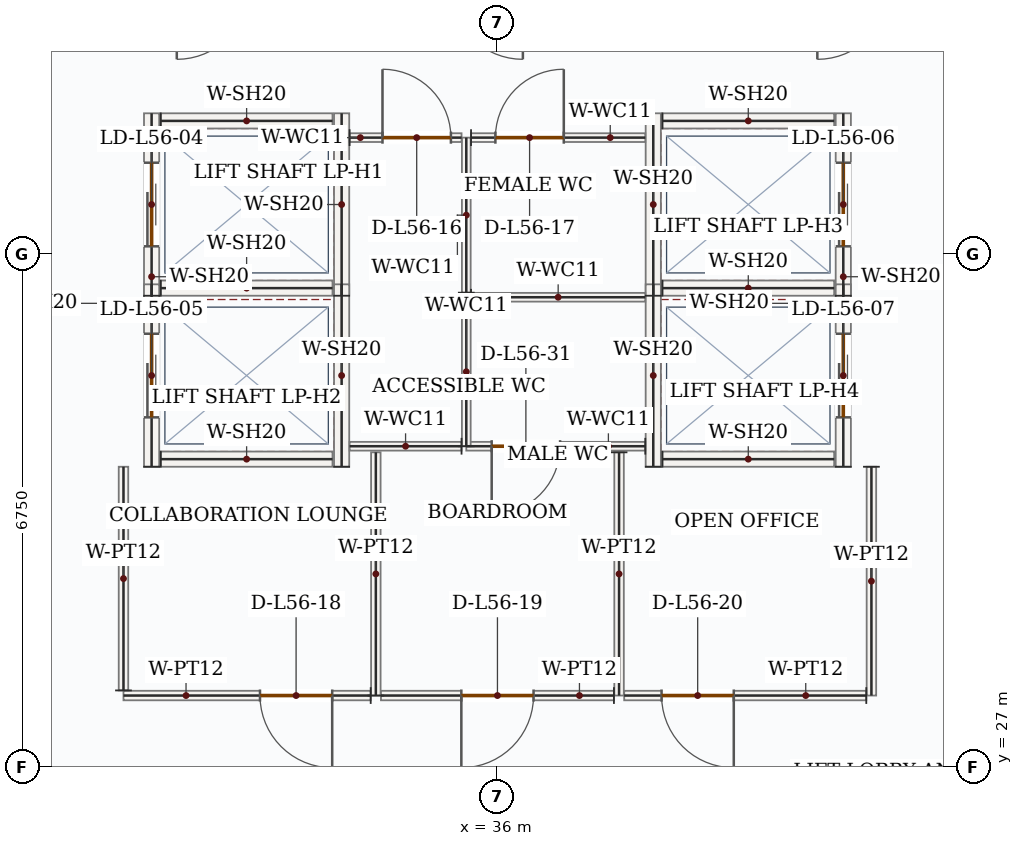
"""IFC4 building model, lengths in metres.
Left out: names, types, materials, properties, quantities, classifications, styles, units other than length and angle.
Written with IfcOpenShell. Run it as: python <this file> out.ifc"""

import sys

from ifc_helpers import new_model, si_unit, direction, frame, frame_2d, origin, place, context, subcontext, project, spatial, rectangle, extrude, source, transform, mapped, element, fill, save


model = new_model("IFC4")
c1 = context("Model", 3, precision=1e-05, world=origin(), true_north=direction((0.0, 1.0)))
c2 = subcontext(c1, "Body", "Model", "MODEL_VIEW")
j1 = project(units=[si_unit("LENGTHUNIT", "METRE"), si_unit("PLANEANGLEUNIT", "RADIAN")], contexts=[c1])
p1 = place(None, origin())
s1 = spatial("IfcSite", under=j1, at=p1, CompositionType="ELEMENT")
p2 = place(p1, origin())
s2 = spatial("IfcBuilding", under=s1, at=p2, CompositionType="ELEMENT")
p3 = place(p2, frame((0.0, 0.0, 239.1)))
s3 = spatial("IfcBuildingStorey", under=s2, at=p3, CompositionType="ELEMENT", Elevation=239.1)
p4 = place(p3, frame((31.45, 33.2, 0.0), z_axis=(0.0, 0.0, 1.0), x_axis=(0.0, 1.0, 0.0)))
e1 = element("IfcWall", 1, at=p4, inside=s3, PredefinedType="SOLIDWALL", context=c2, shape_type="SweptSolid", body=[
    extrude(rectangle(XDim=2.4, YDim=0.2, at=frame_2d((1.2, 0.0))), origin(), (0.0, 0.0, 1.0), 3.5),
])
p5 = place(p4, frame((0.65, 0.0, 0.0)))
e2 = element("IfcOpeningElement", 2, at=p5, cuts=e1, PredefinedType="OPENING", context=c2, shape_type="SweptSolid", body=[
    extrude(rectangle(XDim=1.1, YDim=2.15, at=frame_2d((0.55, 1.075))), frame((0.0, 0.11, 0.0), z_axis=(0.0, -1.0, 0.0), x_axis=(1.0, 0.0, 0.0)), (0.0, 0.0, 1.0), 0.22),
])
m1 = source(origin(), c2, "Body", "SweptSolid", [
    extrude(rectangle(XDim=2.4, YDim=0.2, at=frame_2d((1.2, 0.0))), origin(), (0.0, 0.0, 1.0), 3.5),
])
p6 = place(p3, frame((33.95, 33.2, 0.0), z_axis=(0.0, 0.0, 1.0), x_axis=(0.0, 1.0, 0.0)))
e3 = element("IfcWall", 3, at=p6, inside=s3, PredefinedType="SOLIDWALL", context=c2, shape_type="MappedRepresentation", body=[
    mapped(m1, transform((0.0, 0.0, 0.0), x_axis=(1.0, 0.0, 0.0), y_axis=(0.0, 1.0, 0.0), z_axis=(0.0, 0.0, 1.0), scale=1.0)),
])
m2 = source(origin(), c2, "Body", "SweptSolid", [
    extrude(rectangle(XDim=2.26, YDim=0.2, at=frame_2d((1.13, 0.0))), origin(), (0.0, 0.0, 1.0), 3.5),
])
for number, where, z_axis, x_axis in (
    (4, (31.57, 33.3, 0.0), (0.0, 0.0, 1.0), (1.0, 0.0, 0.0)),
    (5, (31.57, 35.5, 0.0), (0.0, 0.0, 1.0), (1.0, 0.0, 0.0)),
):
    element("IfcWall", number, at=place(p3, frame(where, z_axis=z_axis, x_axis=x_axis)), inside=s3, PredefinedType="SOLIDWALL", context=c2, shape_type="MappedRepresentation", body=[
        mapped(m2, transform((0.0, 0.0, 0.0), x_axis=(1.0, 0.0, 0.0), y_axis=(0.0, 1.0, 0.0), z_axis=(0.0, 0.0, 1.0), scale=1.0)),
    ])
p7 = place(p3, frame((31.45, 30.95, 0.0), z_axis=(0.0, 0.0, 1.0), x_axis=(0.0, 1.0, 0.0)))
e6 = element("IfcWall", 6, at=p7, inside=s3, PredefinedType="SOLIDWALL", context=c2, shape_type="SweptSolid", body=[
    extrude(rectangle(XDim=2.4, YDim=0.2, at=frame_2d((1.2, 0.0))), origin(), (0.0, 0.0, 1.0), 3.5),
])
p8 = place(p7, frame((0.65, 0.0, 0.0)))
e7 = element("IfcOpeningElement", 7, at=p8, cuts=e6, PredefinedType="OPENING", context=c2, shape_type="SweptSolid", body=[
    extrude(rectangle(XDim=1.1, YDim=2.15, at=frame_2d((0.55, 1.075))), frame((0.0, 0.11, 0.0), z_axis=(0.0, -1.0, 0.0), x_axis=(1.0, 0.0, 0.0)), (0.0, 0.0, 1.0), 0.22),
])
p9 = place(p3, frame((33.95, 30.95, 0.0), z_axis=(0.0, 0.0, 1.0), x_axis=(0.0, 1.0, 0.0)))
e8 = element("IfcWall", 8, at=p9, inside=s3, PredefinedType="SOLIDWALL", context=c2, shape_type="MappedRepresentation", body=[
    mapped(m1, transform((0.0, 0.0, 0.0), x_axis=(1.0, 0.0, 0.0), y_axis=(0.0, 1.0, 0.0), z_axis=(0.0, 0.0, 1.0), scale=1.0)),
])
p10 = place(p3, frame((31.57, 31.05, 0.0), z_axis=(0.0, 0.0, 1.0), x_axis=(1.0, 0.0, 0.0)))
e9 = element("IfcWall", 9, at=p10, inside=s3, PredefinedType="SOLIDWALL", context=c2, shape_type="MappedRepresentation", body=[
    mapped(m2, transform((0.0, 0.0, 0.0), x_axis=(1.0, 0.0, 0.0), y_axis=(0.0, 1.0, 0.0), z_axis=(0.0, 0.0, 1.0), scale=1.0)),
])
p11 = place(p3, frame((38.05, 33.2, 0.0), z_axis=(0.0, 0.0, 1.0), x_axis=(0.0, 1.0, 0.0)))
e10 = element("IfcWall", 10, at=p11, inside=s3, PredefinedType="SOLIDWALL", context=c2, shape_type="MappedRepresentation", body=[
    mapped(m1, transform((0.0, 0.0, 0.0), x_axis=(1.0, 0.0, 0.0), y_axis=(0.0, 1.0, 0.0), z_axis=(0.0, 0.0, 1.0), scale=1.0)),
])
p12 = place(p3, frame((40.55, 33.2, 0.0), z_axis=(0.0, 0.0, 1.0), x_axis=(0.0, 1.0, 0.0)))
e11 = element("IfcWall", 11, at=p12, inside=s3, PredefinedType="SOLIDWALL", context=c2, shape_type="SweptSolid", body=[
    extrude(rectangle(XDim=2.4, YDim=0.2, at=frame_2d((1.2, 0.0))), origin(), (0.0, 0.0, 1.0), 3.5),
])
p13 = place(p12, frame((0.65, 0.0, 0.0)))
e12 = element("IfcOpeningElement", 12, at=p13, cuts=e11, PredefinedType="OPENING", context=c2, shape_type="SweptSolid", body=[
    extrude(rectangle(XDim=1.1, YDim=2.15, at=frame_2d((0.55, 1.075))), frame((0.0, 0.11, 0.0), z_axis=(0.0, -1.0, 0.0), x_axis=(1.0, 0.0, 0.0)), (0.0, 0.0, 1.0), 0.22),
])
for number, where, z_axis, x_axis in (
    (13, (38.17, 33.3, 0.0), (0.0, 0.0, 1.0), (1.0, 0.0, 0.0)),
    (14, (38.17, 35.5, 0.0), (0.0, 0.0, 1.0), (1.0, 0.0, 0.0)),
):
    element("IfcWall", number, at=place(p3, frame(where, z_axis=z_axis, x_axis=x_axis)), inside=s3, PredefinedType="SOLIDWALL", context=c2, shape_type="MappedRepresentation", body=[
        mapped(m2, transform((0.0, 0.0, 0.0), x_axis=(1.0, 0.0, 0.0), y_axis=(0.0, 1.0, 0.0), z_axis=(0.0, 0.0, 1.0), scale=1.0)),
    ])
p14 = place(p3, frame((38.05, 30.95, 0.0), z_axis=(0.0, 0.0, 1.0), x_axis=(0.0, 1.0, 0.0)))
e15 = element("IfcWall", 15, at=p14, inside=s3, PredefinedType="SOLIDWALL", context=c2, shape_type="MappedRepresentation", body=[
    mapped(m1, transform((0.0, 0.0, 0.0), x_axis=(1.0, 0.0, 0.0), y_axis=(0.0, 1.0, 0.0), z_axis=(0.0, 0.0, 1.0), scale=1.0)),
])
p15 = place(p3, frame((40.55, 30.95, 0.0), z_axis=(0.0, 0.0, 1.0), x_axis=(0.0, 1.0, 0.0)))
e16 = element("IfcWall", 16, at=p15, inside=s3, PredefinedType="SOLIDWALL", context=c2, shape_type="SweptSolid", body=[
    extrude(rectangle(XDim=2.4, YDim=0.2, at=frame_2d((1.2, 0.0))), origin(), (0.0, 0.0, 1.0), 3.5),
])
p16 = place(p15, frame((0.65, 0.0, 0.0)))
e17 = element("IfcOpeningElement", 17, at=p16, cuts=e16, PredefinedType="OPENING", context=c2, shape_type="SweptSolid", body=[
    extrude(rectangle(XDim=1.1, YDim=2.15, at=frame_2d((0.55, 1.075))), frame((0.0, 0.11, 0.0), z_axis=(0.0, -1.0, 0.0), x_axis=(1.0, 0.0, 0.0)), (0.0, 0.0, 1.0), 0.22),
])
p17 = place(p3, frame((38.17, 31.05, 0.0), z_axis=(0.0, 0.0, 1.0), x_axis=(1.0, 0.0, 0.0)))
e18 = element("IfcWall", 18, at=p17, inside=s3, PredefinedType="SOLIDWALL", context=c2, shape_type="MappedRepresentation", body=[
    mapped(m2, transform((0.0, 0.0, 0.0), x_axis=(1.0, 0.0, 0.0), y_axis=(0.0, 1.0, 0.0), z_axis=(0.0, 0.0, 1.0), scale=1.0)),
])
p18 = place(p3, frame((37.945, 31.22, 0.0), z_axis=(0.0, 0.0, 1.0), x_axis=(-1.0, 0.0, 0.0)))
e19 = element("IfcWall", 19, at=p18, inside=s3, PredefinedType="PARTITIONING", context=c2, shape_type="SweptSolid", body=[
    extrude(rectangle(XDim=2.355, YDim=0.115, at=frame_2d((1.177, 0.0))), origin(), (0.0, 0.0, 1.0), 3.5),
])
p19 = place(p18, frame((1.121, 0.0, 0.0)))
e20 = element("IfcOpeningElement", 20, at=p19, cuts=e19, PredefinedType="OPENING", context=c2, shape_type="SweptSolid", body=[
    extrude(rectangle(XDim=0.9, YDim=2.1, at=frame_2d((0.45, 1.05))), frame((0.0, 0.067, 0.0), z_axis=(0.0, -1.0, 0.0), x_axis=(1.0, 0.0, 0.0)), (0.0, 0.0, 1.0), 0.135),
])
m3 = source(origin(), c2, "Body", "SweptSolid", [
    extrude(rectangle(XDim=1.96, YDim=0.115, at=frame_2d((0.98, 0.0))), origin(), (0.0, 0.0, 1.0), 3.5),
])
p20 = place(p3, frame((35.59, 31.22, 0.0), z_axis=(0.0, 0.0, 1.0), x_axis=(0.0, 1.0, 0.0)))
e21 = element("IfcWall", 21, at=p20, inside=s3, PredefinedType="PARTITIONING", context=c2, shape_type="MappedRepresentation", body=[
    mapped(m3, transform((0.0, 0.0, 0.0), x_axis=(1.0, 0.0, 0.0), y_axis=(0.0, 1.0, 0.0), z_axis=(0.0, 0.0, 1.0), scale=1.0)),
])
m4 = source(origin(), c2, "Body", "SweptSolid", [
    extrude(rectangle(XDim=2.292, YDim=0.115, at=frame_2d((1.146, 0.0))), origin(), (0.0, 0.0, 1.0), 3.5),
])
p21 = place(p3, frame((35.653, 33.18, 0.0), z_axis=(0.0, 0.0, 1.0), x_axis=(1.0, 0.0, 0.0)))
e22 = element("IfcWall", 22, at=p21, inside=s3, PredefinedType="PARTITIONING", context=c2, shape_type="MappedRepresentation", body=[
    mapped(m4, transform((0.0, 0.0, 0.0), x_axis=(1.0, 0.0, 0.0), y_axis=(0.0, 1.0, 0.0), z_axis=(0.0, 0.0, 1.0), scale=1.0)),
])
m5 = source(origin(), c2, "Body", "SweptSolid", [
    extrude(rectangle(XDim=2.04, YDim=0.115, at=frame_2d((1.02, 0.0))), origin(), (0.0, 0.0, 1.0), 3.5),
])
p22 = place(p3, frame((35.59, 33.24, 0.0), z_axis=(0.0, 0.0, 1.0), x_axis=(0.0, 1.0, 0.0)))
e23 = element("IfcWall", 23, at=p22, inside=s3, PredefinedType="PARTITIONING", context=c2, shape_type="MappedRepresentation", body=[
    mapped(m5, transform((0.0, 0.0, 0.0), x_axis=(1.0, 0.0, 0.0), y_axis=(0.0, 1.0, 0.0), z_axis=(0.0, 0.0, 1.0), scale=1.0)),
])
p23 = place(p3, frame((35.653, 35.28, 0.0), z_axis=(0.0, 0.0, 1.0), x_axis=(1.0, 0.0, 0.0)))
e24 = element("IfcWall", 24, at=p23, inside=s3, PredefinedType="PARTITIONING", context=c2, shape_type="SweptSolid", body=[
    extrude(rectangle(XDim=2.292, YDim=0.115, at=frame_2d((1.146, 0.0))), origin(), (0.0, 0.0, 1.0), 3.5),
])
p24 = place(p23, frame((0.32, 0.0, 0.0)))
e25 = element("IfcOpeningElement", 25, at=p24, cuts=e24, PredefinedType="OPENING", context=c2, shape_type="SweptSolid", body=[
    extrude(rectangle(XDim=0.9, YDim=2.1, at=frame_2d((0.45, 1.05))), frame((0.0, 0.067, 0.0), z_axis=(0.0, -1.0, 0.0), x_axis=(1.0, 0.0, 0.0)), (0.0, 0.0, 1.0), 0.135),
])
m6 = source(origin(), c2, "Body", "SweptSolid", [
    extrude(rectangle(XDim=1.473, YDim=0.115, at=frame_2d((0.736, 0.0))), origin(), (0.0, 0.0, 1.0), 3.5),
])
p25 = place(p3, frame((35.528, 31.22, 0.0), z_axis=(0.0, 0.0, 1.0), x_axis=(-1.0, 0.0, 0.0)))
e26 = element("IfcWall", 26, at=p25, inside=s3, PredefinedType="PARTITIONING", context=c2, shape_type="MappedRepresentation", body=[
    mapped(m6, transform((0.0, 0.0, 0.0), x_axis=(1.0, 0.0, 0.0), y_axis=(0.0, 1.0, 0.0), z_axis=(0.0, 0.0, 1.0), scale=1.0)),
])
p26 = place(p3, frame((34.055, 35.28, 0.0), z_axis=(0.0, 0.0, 1.0), x_axis=(1.0, 0.0, 0.0)))
e27 = element("IfcWall", 27, at=p26, inside=s3, PredefinedType="PARTITIONING", context=c2, shape_type="SweptSolid", body=[
    extrude(rectangle(XDim=1.473, YDim=0.115, at=frame_2d((0.736, 0.0))), origin(), (0.0, 0.0, 1.0), 3.5),
])
p27 = place(p26, frame((0.433, 0.0, 0.0)))
e28 = element("IfcOpeningElement", 28, at=p27, cuts=e27, PredefinedType="OPENING", context=c2, shape_type="SweptSolid", body=[
    extrude(rectangle(XDim=0.9, YDim=2.1, at=frame_2d((0.45, 1.05))), frame((0.0, 0.067, 0.0), z_axis=(0.0, -1.0, 0.0), x_axis=(1.0, 0.0, 0.0)), (0.0, 0.0, 1.0), 0.135),
])
m7 = source(origin(), c2, "Body", "SweptSolid", [
    extrude(rectangle(XDim=3.2, YDim=0.125, at=frame_2d((1.6, 0.0))), origin(), (0.0, 0.0, 1.0), 3.5),
])
for number, where, z_axis, x_axis in (
    (29, (34.4, 27.94, 0.0), (0.0, 0.0, 1.0), (0.0, 1.0, 0.0)),
    (30, (37.6, 31.14, 0.0), (0.0, 0.0, 1.0), (0.0, -1.0, 0.0)),
):
    element("IfcWall", number, at=place(p3, frame(where, z_axis=z_axis, x_axis=x_axis)), inside=s3, PredefinedType="PARTITIONING", context=c2, shape_type="MappedRepresentation", body=[
        mapped(m7, transform((0.0, 0.0, 0.0), x_axis=(1.0, 0.0, 0.0), y_axis=(0.0, 1.0, 0.0), z_axis=(0.0, 0.0, 1.0), scale=1.0)),
    ])
p28 = place(p3, frame((37.532, 27.94, 0.0), z_axis=(0.0, 0.0, 1.0), x_axis=(-1.0, 0.0, 0.0)))
e31 = element("IfcWall", 31, at=p28, inside=s3, PredefinedType="PARTITIONING", context=c2, shape_type="SweptSolid", body=[
    extrude(rectangle(XDim=3.065, YDim=0.125, at=frame_2d((1.532, 0.0))), origin(), (0.0, 0.0, 1.0), 3.5),
])
p29 = place(p28, frame((1.058, 0.0, 0.0)))
e32 = element("IfcOpeningElement", 32, at=p29, cuts=e31, PredefinedType="OPENING", context=c2, shape_type="SweptSolid", body=[
    extrude(rectangle(XDim=0.95, YDim=2.15, at=frame_2d((0.475, 1.075))), frame((0.0, 0.073, 0.0), z_axis=(0.0, -1.0, 0.0), x_axis=(1.0, 0.0, 0.0)), (0.0, 0.0, 1.0), 0.145),
])
p30 = place(p3, frame((34.333, 27.94, 0.0), z_axis=(0.0, 0.0, 1.0), x_axis=(-1.0, 0.0, 0.0)))
e33 = element("IfcWall", 33, at=p30, inside=s3, PredefinedType="PARTITIONING", context=c2, shape_type="SweptSolid", body=[
    extrude(rectangle(XDim=3.252, YDim=0.125, at=frame_2d((1.626, 0.0))), origin(), (0.0, 0.0, 1.0), 3.5),
])
p31 = place(p30, frame((0.507, 0.0, 0.0)))
e34 = element("IfcOpeningElement", 34, at=p31, cuts=e33, PredefinedType="OPENING", context=c2, shape_type="SweptSolid", body=[
    extrude(rectangle(XDim=0.95, YDim=2.15, at=frame_2d((0.475, 1.075))), frame((0.0, 0.073, 0.0), z_axis=(0.0, -1.0, 0.0), x_axis=(1.0, 0.0, 0.0)), (0.0, 0.0, 1.0), 0.145),
])
m8 = source(origin(), c2, "Body", "SweptSolid", [
    extrude(rectangle(XDim=2.942, YDim=0.125, at=frame_2d((1.471, 0.0))), origin(), (0.0, 0.0, 1.0), 3.5),
])
p32 = place(p3, frame((31.08, 28.008, 0.0), z_axis=(0.0, 0.0, 1.0), x_axis=(0.0, 1.0, 0.0)))
e35 = element("IfcWall", 35, at=p32, inside=s3, PredefinedType="PARTITIONING", context=c2, shape_type="MappedRepresentation", body=[
    mapped(m8, transform((0.0, 0.0, 0.0), x_axis=(1.0, 0.0, 0.0), y_axis=(0.0, 1.0, 0.0), z_axis=(0.0, 0.0, 1.0), scale=1.0)),
])
m9 = source(origin(), c2, "Body", "SweptSolid", [
    extrude(rectangle(XDim=3.01, YDim=0.125, at=frame_2d((1.505, 0.0))), origin(), (0.0, 0.0, 1.0), 3.5),
])
p33 = place(p3, frame((40.92, 30.95, 0.0), z_axis=(0.0, 0.0, 1.0), x_axis=(0.0, -1.0, 0.0)))
e36 = element("IfcWall", 36, at=p33, inside=s3, PredefinedType="PARTITIONING", context=c2, shape_type="MappedRepresentation", body=[
    mapped(m9, transform((0.0, 0.0, 0.0), x_axis=(1.0, 0.0, 0.0), y_axis=(0.0, 1.0, 0.0), z_axis=(0.0, 0.0, 1.0), scale=1.0)),
])
p34 = place(p3, frame((40.853, 27.94, 0.0), z_axis=(0.0, 0.0, 1.0), x_axis=(-1.0, 0.0, 0.0)))
e37 = element("IfcWall", 37, at=p34, inside=s3, PredefinedType="PARTITIONING", context=c2, shape_type="SweptSolid", body=[
    extrude(rectangle(XDim=3.185, YDim=0.125, at=frame_2d((1.593, 0.0))), origin(), (0.0, 0.0, 1.0), 3.5),
])
p35 = place(p34, frame((1.743, 0.0, 0.0)))
e38 = element("IfcOpeningElement", 38, at=p35, cuts=e37, PredefinedType="OPENING", context=c2, shape_type="SweptSolid", body=[
    extrude(rectangle(XDim=0.95, YDim=2.15, at=frame_2d((0.475, 1.075))), frame((0.0, 0.073, 0.0), z_axis=(0.0, -1.0, 0.0), x_axis=(1.0, 0.0, 0.0)), (0.0, 0.0, 1.0), 0.145),
])
m10 = source(origin(), c2, "Body", "SweptSolid", [
    extrude(rectangle(XDim=1.1, YDim=2.15, at=frame_2d((0.55, 1.075))), frame((0.0, 0.025, 0.0), z_axis=(0.0, -1.0, 0.0), x_axis=(1.0, 0.0, 0.0)), (0.0, 0.0, 1.0), 0.05),
])
p36 = place(p5, origin())
e39 = element("IfcDoor", 39, at=p36, inside=s3, OperationType="DOUBLE_DOOR_SLIDING", PredefinedType="DOOR", context=c2, shape_type="MappedRepresentation", body=[
    mapped(m10, transform((0.0, 0.0, 0.0), x_axis=(1.0, 0.0, 0.0), y_axis=(0.0, 1.0, 0.0), z_axis=(0.0, 0.0, 1.0), scale=1.0)),
])
fill(e2, e39)
p37 = place(p8, origin())
e40 = element("IfcDoor", 40, at=p37, inside=s3, OperationType="DOUBLE_DOOR_SLIDING", PredefinedType="DOOR", context=c2, shape_type="MappedRepresentation", body=[
    mapped(m10, transform((0.0, 0.0, 0.0), x_axis=(1.0, 0.0, 0.0), y_axis=(0.0, 1.0, 0.0), z_axis=(0.0, 0.0, 1.0), scale=1.0)),
])
fill(e7, e40)
p38 = place(p13, origin())
e41 = element("IfcDoor", 41, at=p38, inside=s3, OperationType="DOUBLE_DOOR_SLIDING", PredefinedType="DOOR", context=c2, shape_type="MappedRepresentation", body=[
    mapped(m10, transform((0.0, 0.0, 0.0), x_axis=(1.0, 0.0, 0.0), y_axis=(0.0, 1.0, 0.0), z_axis=(0.0, 0.0, 1.0), scale=1.0)),
])
fill(e12, e41)
p39 = place(p16, origin())
e42 = element("IfcDoor", 42, at=p39, inside=s3, OperationType="DOUBLE_DOOR_SLIDING", PredefinedType="DOOR", context=c2, shape_type="MappedRepresentation", body=[
    mapped(m10, transform((0.0, 0.0, 0.0), x_axis=(1.0, 0.0, 0.0), y_axis=(0.0, 1.0, 0.0), z_axis=(0.0, 0.0, 1.0), scale=1.0)),
])
fill(e17, e42)
m11 = source(origin(), c2, "Body", "SweptSolid", [
    extrude(rectangle(XDim=0.9, YDim=2.1, at=frame_2d((0.45, 1.05))), frame((0.0, 0.025, 0.0), z_axis=(0.0, -1.0, 0.0), x_axis=(1.0, 0.0, 0.0)), (0.0, 0.0, 1.0), 0.05),
])
p40 = place(p27, origin())
e43 = element("IfcDoor", 43, at=p40, inside=s3, OperationType="SINGLE_SWING_LEFT", PredefinedType="DOOR", context=c2, shape_type="MappedRepresentation", body=[
    mapped(m11, transform((0.0, 0.0, 0.0), x_axis=(1.0, 0.0, 0.0), y_axis=(0.0, 1.0, 0.0), z_axis=(0.0, 0.0, 1.0), scale=1.0)),
])
fill(e28, e43)
p41 = place(p24, origin())
e44 = element("IfcDoor", 44, at=p41, inside=s3, OperationType="SINGLE_SWING_RIGHT", PredefinedType="DOOR", context=c2, shape_type="MappedRepresentation", body=[
    mapped(m11, transform((0.0, 0.0, 0.0), x_axis=(1.0, 0.0, 0.0), y_axis=(0.0, 1.0, 0.0), z_axis=(0.0, 0.0, 1.0), scale=1.0)),
])
fill(e25, e44)
m12 = source(origin(), c2, "Body", "SweptSolid", [
    extrude(rectangle(XDim=0.95, YDim=2.15, at=frame_2d((0.475, 1.075))), frame((0.0, 0.025, 0.0), z_axis=(0.0, -1.0, 0.0), x_axis=(1.0, 0.0, 0.0)), (0.0, 0.0, 1.0), 0.05),
])
p42 = place(p31, origin())
e45 = element("IfcDoor", 45, at=p42, inside=s3, OperationType="SINGLE_SWING_LEFT", PredefinedType="DOOR", context=c2, shape_type="MappedRepresentation", body=[
    mapped(m12, transform((0.0, 0.0, 0.0), x_axis=(1.0, 0.0, 0.0), y_axis=(0.0, 1.0, 0.0), z_axis=(0.0, 0.0, 1.0), scale=1.0)),
])
fill(e34, e45)
p43 = place(p29, origin())
e46 = element("IfcDoor", 46, at=p43, inside=s3, OperationType="SINGLE_SWING_RIGHT", PredefinedType="DOOR", context=c2, shape_type="MappedRepresentation", body=[
    mapped(m12, transform((0.0, 0.0, 0.0), x_axis=(1.0, 0.0, 0.0), y_axis=(0.0, 1.0, 0.0), z_axis=(0.0, 0.0, 1.0), scale=1.0)),
])
fill(e32, e46)
p44 = place(p35, origin())
e47 = element("IfcDoor", 47, at=p44, inside=s3, OperationType="SINGLE_SWING_LEFT", PredefinedType="DOOR", context=c2, shape_type="MappedRepresentation", body=[
    mapped(m12, transform((0.0, 0.0, 0.0), x_axis=(1.0, 0.0, 0.0), y_axis=(0.0, 1.0, 0.0), z_axis=(0.0, 0.0, 1.0), scale=1.0)),
])
fill(e38, e47)
p45 = place(p19, origin())
e48 = element("IfcDoor", 48, at=p45, inside=s3, OperationType="SINGLE_SWING_RIGHT", PredefinedType="DOOR", context=c2, shape_type="MappedRepresentation", body=[
    mapped(m11, transform((0.0, 0.0, 0.0), x_axis=(1.0, 0.0, 0.0), y_axis=(0.0, 1.0, 0.0), z_axis=(0.0, 0.0, 1.0), scale=1.0)),
])
fill(e20, e48)
save(model, sys.argv[1])
